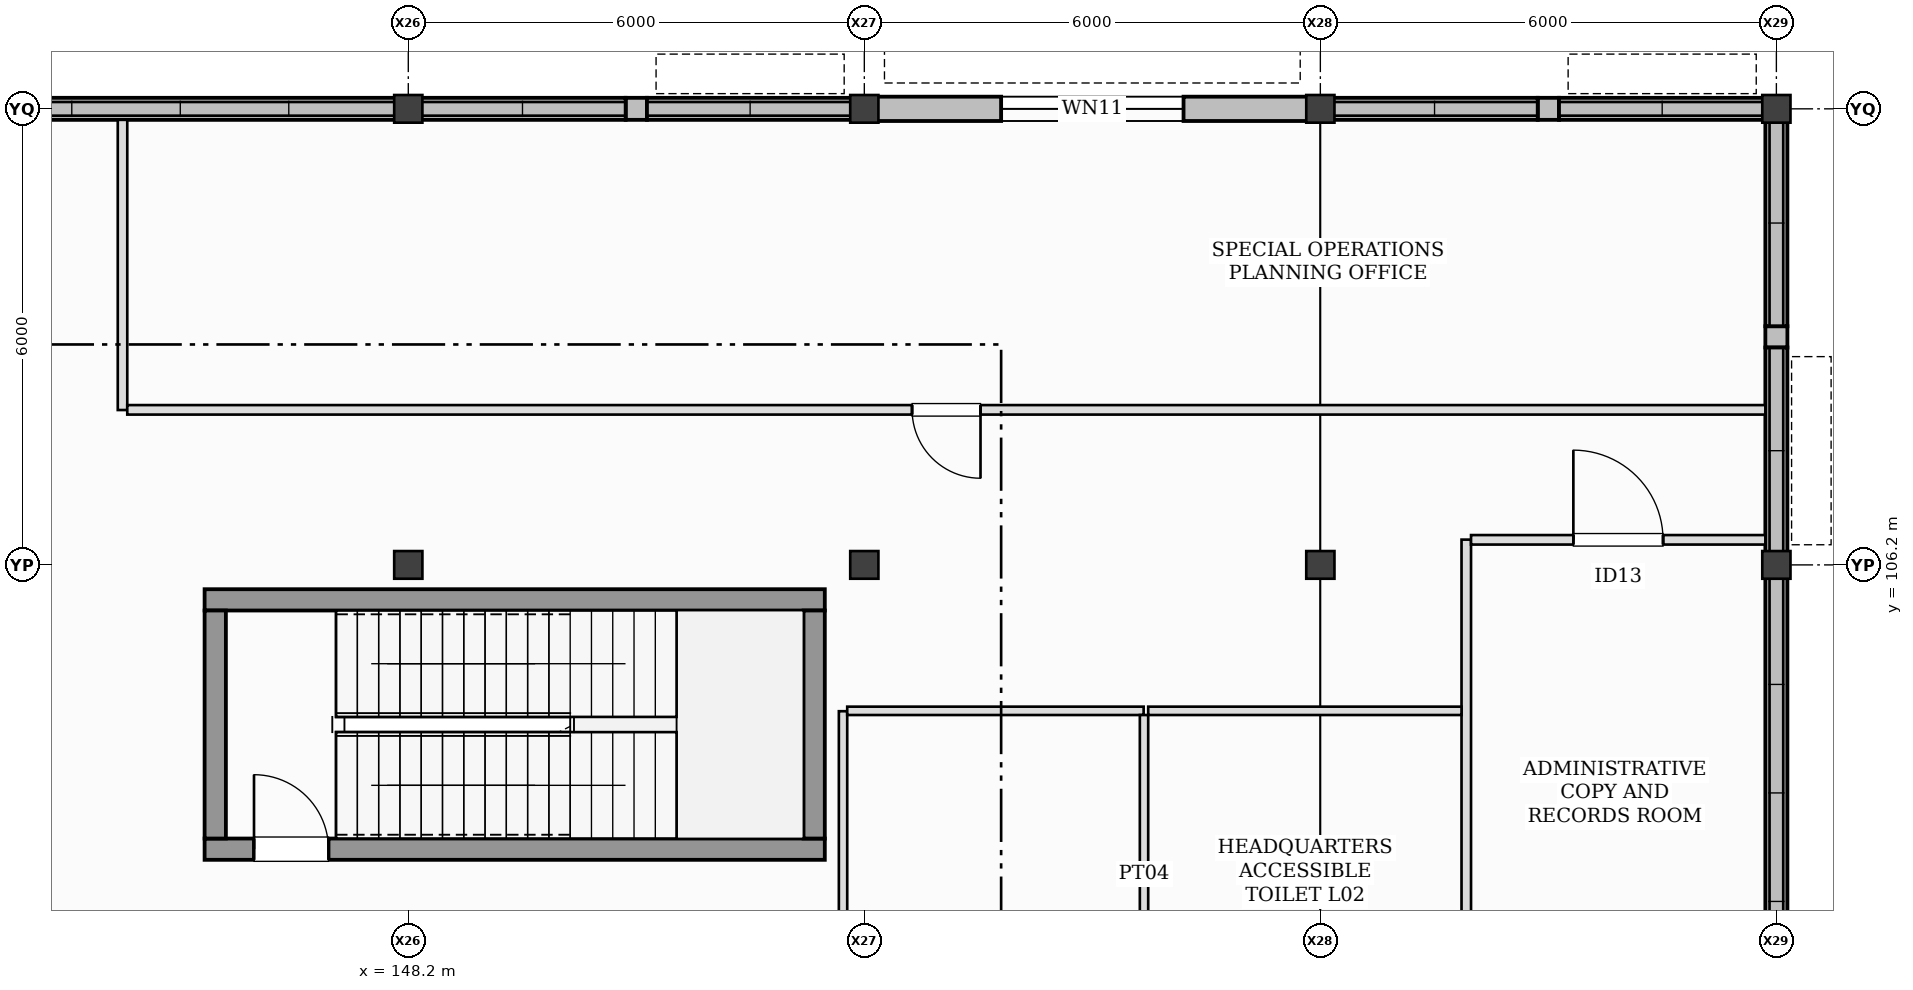
"""IFC4 building model, lengths in metres.
Left out: names, types, materials, properties, quantities, classifications, styles, units other than length and angle.
Written with IfcOpenShell. Run it as: python <this file> out.ifc"""

import sys

from ifc_helpers import new_model, si_unit, direction, frame, frame_2d, origin, origin_2d, place, context, subcontext, project, spatial, rectangle, i_section, extrude, element, fill, save


model = new_model("IFC4")
c1 = context("Model", 3, precision=1e-05, world=origin(), true_north=direction((0.0, 1.0)))
c2 = subcontext(c1, "Body", "Model", "MODEL_VIEW")
j1 = project(units=[si_unit("LENGTHUNIT", "METRE"), si_unit("PLANEANGLEUNIT", "RADIAN")], contexts=[c1])
p1 = place(None, origin())
s1 = spatial("IfcSite", under=j1, at=p1, CompositionType="ELEMENT")
p2 = place(p1, origin())
s2 = spatial("IfcBuilding", under=s1, at=p2, CompositionType="ELEMENT")
p3 = place(p2, frame((0.0, 0.0, 6.0)))
s3 = spatial("IfcBuildingStorey", under=s2, at=p3, CompositionType="ELEMENT", Elevation=6.0)
for number, where, z_axis, x_axis in (
    (1, (148.2, 106.2, 0.0), (0.0, 0.0, 1.0), (1.0, 0.0, 0.0)),
    (2, (148.2, 112.2, 0.0), (0.0, 0.0, 1.0), (1.0, 0.0, 0.0)),
    (3, (154.2, 106.2, 0.0), (0.0, 0.0, 1.0), (1.0, 0.0, 0.0)),
    (4, (154.2, 112.2, 0.0), (0.0, 0.0, 1.0), (1.0, 0.0, 0.0)),
    (5, (160.2, 106.2, 0.0), (0.0, 0.0, 1.0), (1.0, 0.0, 0.0)),
    (6, (160.2, 112.2, 0.0), (0.0, 0.0, 1.0), (1.0, 0.0, 0.0)),
    (7, (166.2, 106.2, 0.0), (0.0, 0.0, 1.0), (1.0, 0.0, 0.0)),
    (8, (166.2, 112.2, 0.0), (0.0, 0.0, 1.0), (1.0, 0.0, 0.0)),
):
    element("IfcColumn", number, at=place(p3, frame(where, z_axis=z_axis, x_axis=x_axis)), inside=s3, PredefinedType="COLUMN", context=c2, shape_type="SweptSolid", body=[
        extrude(i_section(OverallWidth=0.371, OverallDepth=0.364, WebThickness=0.013, FlangeThickness=0.022, at=origin_2d()), origin(), (0.0, 0.0, 1.0), 4.0),
    ])
p4 = place(p3, frame((148.055, 112.2, 0.0), z_axis=(0.0, 0.0, 1.0), x_axis=(-1.0, 0.0, 0.0)))
e9 = element("IfcWall", 9, at=p4, inside=s3, PredefinedType="STANDARD", context=c2, shape_type="SweptSolid", body=[
    extrude(rectangle(XDim=5.71, YDim=0.29, at=frame_2d((2.855, 0.0))), origin(), (0.0, 0.0, 1.0), 0.68),
])
p5 = place(p3, frame((151.34, 112.2, 0.0), z_axis=(0.0, 0.0, 1.0), x_axis=(-1.0, 0.0, 0.0)))
e10 = element("IfcWall", 10, at=p5, inside=s3, PredefinedType="STANDARD", context=c2, shape_type="SweptSolid", body=[
    extrude(rectangle(XDim=0.28, YDim=0.29, at=frame_2d((0.14, 0.0))), origin(), (0.0, 0.0, 1.0), 3.153),
])
p6 = place(p3, frame((154.055, 112.2, 0.0), z_axis=(0.0, 0.0, 1.0), x_axis=(-1.0, 0.0, 0.0)))
e11 = element("IfcWall", 11, at=p6, inside=s3, PredefinedType="STANDARD", context=c2, shape_type="SweptSolid", body=[
    extrude(rectangle(XDim=2.715, YDim=0.29, at=frame_2d((1.357, 0.0))), origin(), (0.0, 0.0, 1.0), 0.8),
])
p7 = place(p3, frame((151.06, 112.2, 0.0), z_axis=(0.0, 0.0, 1.0), x_axis=(-1.0, 0.0, 0.0)))
e12 = element("IfcWall", 12, at=p7, inside=s3, PredefinedType="STANDARD", context=c2, shape_type="SweptSolid", body=[
    extrude(rectangle(XDim=2.715, YDim=0.29, at=frame_2d((1.357, 0.0))), origin(), (0.0, 0.0, 1.0), 0.92),
])
p8 = place(p3, frame((160.055, 112.2, 0.0), z_axis=(0.0, 0.0, 1.0), x_axis=(-1.0, 0.0, 0.0)))
e13 = element("IfcWall", 13, at=p8, inside=s3, PredefinedType="STANDARD", context=c2, shape_type="SweptSolid", body=[
    extrude(rectangle(XDim=5.71, YDim=0.32, at=frame_2d((2.855, 0.0))), origin(), (0.0, 0.0, 1.0), 3.153),
])
p9 = place(p8, frame((1.655, 0.0, 1.0)))
e14 = element("IfcOpeningElement", 14, at=p9, cuts=e13, PredefinedType="OPENING", context=c2, shape_type="SweptSolid", body=[
    extrude(rectangle(XDim=2.4, YDim=1.36, at=frame_2d((1.2, 0.68))), frame((0.0, 0.17, 0.0), z_axis=(0.0, -1.0, 0.0), x_axis=(1.0, 0.0, 0.0)), (0.0, 0.0, 1.0), 0.34),
])
p10 = place(p3, frame((163.34, 112.2, 0.0), z_axis=(0.0, 0.0, 1.0), x_axis=(-1.0, 0.0, 0.0)))
e15 = element("IfcWall", 15, at=p10, inside=s3, PredefinedType="STANDARD", context=c2, shape_type="SweptSolid", body=[
    extrude(rectangle(XDim=0.28, YDim=0.29, at=frame_2d((0.14, 0.0))), origin(), (0.0, 0.0, 1.0), 3.223),
])
p11 = place(p3, frame((166.055, 112.2, 0.0), z_axis=(0.0, 0.0, 1.0), x_axis=(-1.0, 0.0, 0.0)))
e16 = element("IfcWall", 16, at=p11, inside=s3, PredefinedType="STANDARD", context=c2, shape_type="SweptSolid", body=[
    extrude(rectangle(XDim=2.715, YDim=0.29, at=frame_2d((1.357, 0.0))), origin(), (0.0, 0.0, 1.0), 0.32),
])
p12 = place(p3, frame((163.06, 112.2, 0.0), z_axis=(0.0, 0.0, 1.0), x_axis=(-1.0, 0.0, 0.0)))
e17 = element("IfcWall", 17, at=p12, inside=s3, PredefinedType="STANDARD", context=c2, shape_type="SweptSolid", body=[
    extrude(rectangle(XDim=2.715, YDim=0.29, at=frame_2d((1.357, 0.0))), origin(), (0.0, 0.0, 1.0), 0.44),
])
p13 = place(p3, frame((166.2, 100.345, 0.0), z_axis=(0.0, 0.0, 1.0), x_axis=(0.0, 1.0, 0.0)))
e18 = element("IfcWall", 18, at=p13, inside=s3, PredefinedType="STANDARD", context=c2, shape_type="SweptSolid", body=[
    extrude(rectangle(XDim=5.71, YDim=0.29, at=frame_2d((2.855, 0.0))), origin(), (0.0, 0.0, 1.0), 0.68),
])
p14 = place(p3, frame((166.2, 109.06, 0.0), z_axis=(0.0, 0.0, 1.0), x_axis=(0.0, 1.0, 0.0)))
e19 = element("IfcWall", 19, at=p14, inside=s3, PredefinedType="STANDARD", context=c2, shape_type="SweptSolid", body=[
    extrude(rectangle(XDim=0.28, YDim=0.29, at=frame_2d((0.14, 0.0))), origin(), (0.0, 0.0, 1.0), 3.227),
])
p15 = place(p3, frame((166.2, 106.345, 0.0), z_axis=(0.0, 0.0, 1.0), x_axis=(0.0, 1.0, 0.0)))
e20 = element("IfcWall", 20, at=p15, inside=s3, PredefinedType="STANDARD", context=c2, shape_type="SweptSolid", body=[
    extrude(rectangle(XDim=2.715, YDim=0.29, at=frame_2d((1.357, 0.0))), origin(), (0.0, 0.0, 1.0), 0.8),
])
p16 = place(p3, frame((166.2, 109.34, 0.0), z_axis=(0.0, 0.0, 1.0), x_axis=(0.0, 1.0, 0.0)))
e21 = element("IfcWall", 21, at=p16, inside=s3, PredefinedType="STANDARD", context=c2, shape_type="SweptSolid", body=[
    extrude(rectangle(XDim=2.715, YDim=0.29, at=frame_2d((1.357, 0.0))), origin(), (0.0, 0.0, 1.0), 0.92),
])
p17 = place(p3, frame((145.52, 102.46, 0.0), z_axis=(0.0, 0.0, 1.0), x_axis=(1.0, 0.0, 0.0)))
e22 = element("IfcWall", 22, at=p17, inside=s3, PredefinedType="SHEAR", context=c2, shape_type="SweptSolid", body=[
    extrude(rectangle(XDim=8.16, YDim=0.28, at=frame_2d((4.08, 0.0))), origin(), (0.0, 0.0, 1.0), 4.0),
])
p18 = place(p17, frame((0.65, 0.0, 0.0)))
e23 = element("IfcOpeningElement", 23, at=p18, cuts=e22, PredefinedType="OPENING", context=c2, shape_type="SweptSolid", body=[
    extrude(rectangle(XDim=0.98, YDim=2.15, at=frame_2d((0.49, 1.075))), frame((0.0, 0.15, 0.0), z_axis=(0.0, -1.0, 0.0), x_axis=(1.0, 0.0, 0.0)), (0.0, 0.0, 1.0), 0.3),
])
p19 = place(p3, frame((153.68, 105.74, 0.0), z_axis=(0.0, 0.0, 1.0), x_axis=(-1.0, 0.0, 0.0)))
e24 = element("IfcWall", 24, at=p19, inside=s3, PredefinedType="SHEAR", context=c2, shape_type="SweptSolid", body=[
    extrude(rectangle(XDim=8.16, YDim=0.28, at=frame_2d((4.08, 0.0))), origin(), (0.0, 0.0, 1.0), 4.0),
])
for number, where, z_axis, x_axis in (
    (25, (145.66, 105.6, 0.0), (0.0, 0.0, 1.0), (0.0, -1.0, 0.0)),
    (26, (153.54, 102.6, 0.0), (0.0, 0.0, 1.0), (0.0, 1.0, 0.0)),
):
    element("IfcWall", number, at=place(p3, frame(where, z_axis=z_axis, x_axis=x_axis)), inside=s3, PredefinedType="SHEAR", context=c2, shape_type="SweptSolid", body=[
        extrude(rectangle(XDim=3.0, YDim=0.28, at=frame_2d((1.5, 0.0))), origin(), (0.0, 0.0, 1.0), 4.0),
    ])
p20 = place(p3, frame((144.44, 108.238, 0.0), z_axis=(0.0, 0.0, 1.0), x_axis=(0.0, 1.0, 0.0)))
e27 = element("IfcWall", 27, at=p20, inside=s3, PredefinedType="PARTITIONING", context=c2, shape_type="SweptSolid", body=[
    extrude(rectangle(XDim=3.817, YDim=0.125, at=frame_2d((1.909, 0.0))), origin(), (0.0, 0.0, 1.0), 3.289),
])
p21 = place(p3, frame((166.055, 108.24, 0.0), z_axis=(0.0, 0.0, 1.0), x_axis=(-1.0, 0.0, 0.0)))
e28 = element("IfcWall", 28, at=p21, inside=s3, PredefinedType="PARTITIONING", context=c2, shape_type="SweptSolid", body=[
    extrude(rectangle(XDim=21.552, YDim=0.125, at=frame_2d((10.776, 0.0))), origin(), (0.0, 0.0, 1.0), 3.72),
])
p22 = place(p21, frame((10.326, 0.0, 0.0)))
e29 = element("IfcOpeningElement", 29, at=p22, cuts=e28, PredefinedType="OPENING", context=c2, shape_type="SweptSolid", body=[
    extrude(rectangle(XDim=0.9, YDim=2.1, at=frame_2d((0.45, 1.05))), frame((0.0, 0.073, 0.0), z_axis=(0.0, -1.0, 0.0), x_axis=(1.0, 0.0, 0.0)), (0.0, 0.0, 1.0), 0.145),
])
p23 = place(p3, frame((153.92, 100.045, 0.0), z_axis=(0.0, 0.0, 1.0), x_axis=(0.0, 1.0, 0.0)))
e30 = element("IfcWall", 30, at=p23, inside=s3, PredefinedType="PARTITIONING", context=c2, shape_type="SweptSolid", body=[
    extrude(rectangle(XDim=4.23, YDim=0.11, at=frame_2d((2.115, 0.0))), origin(), (0.0, 0.0, 1.0), 3.157),
])
p24 = place(p3, frame((153.975, 104.28, 0.0), z_axis=(0.0, 0.0, 1.0), x_axis=(1.0, 0.0, 0.0)))
e31 = element("IfcWall", 31, at=p24, inside=s3, PredefinedType="PARTITIONING", context=c2, shape_type="SweptSolid", body=[
    extrude(rectangle(XDim=3.9, YDim=0.11, at=frame_2d((1.95, 0.0))), origin(), (0.0, 0.0, 1.0), 3.72),
])
p25 = place(p3, frame((157.88, 104.225, 0.0), z_axis=(0.0, 0.0, 1.0), x_axis=(0.0, -1.0, 0.0)))
e32 = element("IfcWall", 32, at=p25, inside=s3, PredefinedType="PARTITIONING", context=c2, shape_type="SweptSolid", body=[
    extrude(rectangle(XDim=4.18, YDim=0.11, at=frame_2d((2.09, 0.0))), origin(), (0.0, 0.0, 1.0), 3.334),
])
p26 = place(p3, frame((162.12, 100.038, 0.0), z_axis=(0.0, 0.0, 1.0), x_axis=(0.0, 1.0, 0.0)))
e33 = element("IfcWall", 33, at=p26, inside=s3, PredefinedType="PARTITIONING", context=c2, shape_type="SweptSolid", body=[
    extrude(rectangle(XDim=6.495, YDim=0.125, at=frame_2d((3.248, 0.0))), origin(), (0.0, 0.0, 1.0), 3.449),
])
p27 = place(p3, frame((162.183, 106.53, 0.0), z_axis=(0.0, 0.0, 1.0), x_axis=(1.0, 0.0, 0.0)))
e34 = element("IfcWall", 34, at=p27, inside=s3, PredefinedType="PARTITIONING", context=c2, shape_type="SweptSolid", body=[
    extrude(rectangle(XDim=3.872, YDim=0.125, at=frame_2d((1.936, 0.0))), origin(), (0.0, 0.0, 1.0), 3.223),
])
p28 = place(p27, frame((1.346, 0.0, 0.0)))
e35 = element("IfcOpeningElement", 35, at=p28, cuts=e34, PredefinedType="OPENING", context=c2, shape_type="SweptSolid", body=[
    extrude(rectangle(XDim=1.18, YDim=2.16, at=frame_2d((0.59, 1.08))), frame((0.0, 0.073, 0.0), z_axis=(0.0, -1.0, 0.0), x_axis=(1.0, 0.0, 0.0)), (0.0, 0.0, 1.0), 0.145),
])
p29 = place(p3, frame((157.935, 104.28, 0.0), z_axis=(0.0, 0.0, 1.0), x_axis=(1.0, 0.0, 0.0)))
e36 = element("IfcWall", 36, at=p29, inside=s3, PredefinedType="PARTITIONING", context=c2, shape_type="SweptSolid", body=[
    extrude(rectangle(XDim=4.123, YDim=0.11, at=frame_2d((2.061, 0.0))), origin(), (0.0, 0.0, 1.0), 3.72),
])
p30 = place(p9, origin())
e37 = element("IfcWindow", 37, at=p30, inside=s3, PartitioningType="SINGLE_PANEL", PredefinedType="WINDOW", context=c2, shape_type="SweptSolid", body=[
    extrude(rectangle(XDim=2.4, YDim=1.36, at=frame_2d((1.2, 0.68))), frame((0.0, 0.03, 0.0), z_axis=(0.0, -1.0, 0.0), x_axis=(1.0, 0.0, 0.0)), (0.0, 0.0, 1.0), 0.06),
])
fill(e14, e37)
p31 = place(p18, origin())
e38 = element("IfcDoor", 38, at=p31, inside=s3, OperationType="SINGLE_SWING_LEFT", PredefinedType="DOOR", context=c2, shape_type="SweptSolid", body=[
    extrude(rectangle(XDim=0.98, YDim=2.15, at=frame_2d((0.49, 1.075))), frame((0.0, 0.025, 0.0), z_axis=(0.0, -1.0, 0.0), x_axis=(1.0, 0.0, 0.0)), (0.0, 0.0, 1.0), 0.05),
])
fill(e23, e38)
p32 = place(p22, frame((0.9, 0.0, 0.0), z_axis=(0.0, 0.0, 1.0), x_axis=(-1.0, 0.0, 0.0)))
e39 = element("IfcDoor", 39, at=p32, inside=s3, OperationType="SINGLE_SWING_LEFT", PredefinedType="DOOR", context=c2, shape_type="SweptSolid", body=[
    extrude(rectangle(XDim=0.9, YDim=2.1, at=frame_2d((0.45, 1.05))), frame((0.0, 0.025, 0.0), z_axis=(0.0, -1.0, 0.0), x_axis=(1.0, 0.0, 0.0)), (0.0, 0.0, 1.0), 0.05),
])
fill(e29, e39)
p33 = place(p28, frame((1.18, 0.0, 0.0), z_axis=(0.0, 0.0, 1.0), x_axis=(-1.0, 0.0, 0.0)))
e40 = element("IfcDoor", 40, at=p33, inside=s3, OperationType="SINGLE_SWING_LEFT", PredefinedType="DOOR", context=c2, shape_type="SweptSolid", body=[
    extrude(rectangle(XDim=1.18, YDim=2.16, at=frame_2d((0.59, 1.08))), frame((0.0, 0.025, 0.0), z_axis=(0.0, -1.0, 0.0), x_axis=(1.0, 0.0, 0.0)), (0.0, 0.0, 1.0), 0.05),
])
fill(e35, e40)
save(model, sys.argv[1])
